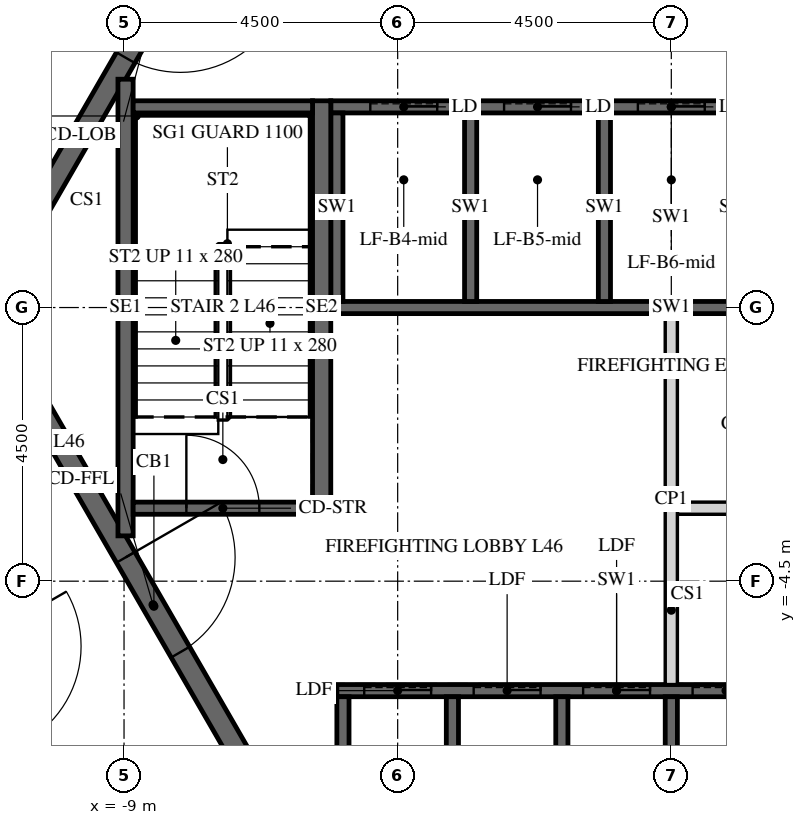
"""IFC4 building model, lengths in metres.
Left out: names, types, materials, properties, quantities, classifications, styles, units other than length and angle.
Written with IfcOpenShell. Run it as: python <this file> out.ifc"""

import sys

from ifc_helpers import new_model, si_unit, direction, frame, frame_2d, origin, place, context, subcontext, project, spatial, polyline, rectangle, outline, extrude, element, fill, save


model = new_model("IFC4")
c1 = context("Model", 3, precision=1e-05, world=origin(), true_north=direction((0.0, 1.0)))
c2 = subcontext(c1, "Body", "Model", "MODEL_VIEW")
j1 = project(units=[si_unit("LENGTHUNIT", "METRE"), si_unit("PLANEANGLEUNIT", "RADIAN")], contexts=[c1])
p1 = place(None, origin())
s1 = spatial("IfcSite", under=j1, at=p1, CompositionType="ELEMENT")
p2 = place(p1, origin())
s2 = spatial("IfcBuilding", under=s1, at=p2, CompositionType="ELEMENT")
p3 = place(p2, frame((0.0, 0.0, 195.6)))
s3 = spatial("IfcBuildingStorey", under=s2, at=p3, CompositionType="ELEMENT", Elevation=195.6)
p4 = place(p3, frame((-7.361, 12.75, -0.15), z_axis=(0.0, 0.0, 1.0), x_axis=(-0.50000571537, -0.866022103989, 0.0)))
e1 = element("IfcWall", 1, at=p4, inside=s3, PredefinedType="SHEAR", context=c2, shape_type="SweptSolid", body=[
    extrude(outline(polyline([(-0.144, -0.25), (14.867, -0.25), (14.578, 0.25), (0.144, 0.25), (-0.144, -0.25)])), origin(), (0.0, 0.0, 1.0), 3.9),
])
p5 = place(p4, frame((6.49, 0.0, 0.15)))
e2 = element("IfcOpeningElement", 2, at=p5, cuts=e1, PredefinedType="OPENING", context=c2, shape_type="SweptSolid", body=[
    extrude(rectangle(XDim=1.8, YDim=2.4, at=frame_2d((0.9, 1.2))), frame((0.0, 0.26, 0.0), z_axis=(0.0, -1.0, 0.0), x_axis=(1.0, 0.0, 0.0)), (0.0, 0.0, 1.0), 0.52),
])
p6 = place(p3, frame((-14.722, 0.0, -0.15), z_axis=(0.0, 0.0, 1.0), x_axis=(0.50000571537, -0.866022103989, 0.0)))
e3 = element("IfcWall", 3, at=p6, inside=s3, PredefinedType="SHEAR", context=c2, shape_type="SweptSolid", body=[
    extrude(outline(polyline([(-0.144, -0.25), (14.867, -0.25), (14.578, 0.25), (0.144, 0.25), (-0.144, -0.25)])), origin(), (0.0, 0.0, 1.0), 3.9),
])
p7 = place(p6, frame((6.432, 0.0, 0.15)))
e4 = element("IfcOpeningElement", 4, at=p7, cuts=e3, PredefinedType="OPENING", context=c2, shape_type="SweptSolid", body=[
    extrude(rectangle(XDim=1.8, YDim=2.4, at=frame_2d((0.9, 1.2))), frame((0.0, 0.26, 0.0), z_axis=(0.0, -1.0, 0.0), x_axis=(1.0, 0.0, 0.0)), (0.0, 0.0, 1.0), 0.52),
])
p8 = place(p3, frame((-5.673, 9.825, -0.15), z_axis=(0.0, 0.0, 1.0), x_axis=(-0.499995046907, -0.866028263435, 0.0)))
e5 = element("IfcWall", 5, at=p8, inside=s3, PredefinedType="SHEAR", context=c2, shape_type="SweptSolid", body=[
    extrude(outline(polyline([(-0.101, -0.175), (11.446, -0.175), (11.244, 0.175), (0.101, 0.175), (-0.101, -0.175)])), origin(), (0.0, 0.0, 1.0), 3.9),
])
p9 = place(p8, frame((4.801, 0.0, 0.15)))
e6 = element("IfcOpeningElement", 6, at=p9, cuts=e5, PredefinedType="OPENING", context=c2, shape_type="SweptSolid", body=[
    extrude(rectangle(XDim=1.8, YDim=2.4, at=frame_2d((0.9, 1.2))), frame((0.0, 0.185, 0.0), z_axis=(0.0, -1.0, 0.0), x_axis=(1.0, 0.0, 0.0)), (0.0, 0.0, 1.0), 0.37),
])
p10 = place(p3, frame((-11.345, 0.0, -0.15), z_axis=(0.0, 0.0, 1.0), x_axis=(0.499995046907, -0.866028263435, 0.0)))
e7 = element("IfcWall", 7, at=p10, inside=s3, PredefinedType="SHEAR", context=c2, shape_type="SweptSolid", body=[
    extrude(outline(polyline([(-0.101, -0.175), (11.446, -0.175), (11.244, 0.175), (0.101, 0.175), (-0.101, -0.175)])), origin(), (0.0, 0.0, 1.0), 3.9),
])
p11 = place(p10, frame((4.744, 0.0, 0.15)))
e8 = element("IfcOpeningElement", 8, at=p11, cuts=e7, PredefinedType="OPENING", context=c2, shape_type="SweptSolid", body=[
    extrude(rectangle(XDim=1.8, YDim=2.4, at=frame_2d((0.9, 1.2))), frame((0.0, 0.185, 0.0), z_axis=(0.0, -1.0, 0.0), x_axis=(1.0, 0.0, 0.0)), (0.0, 0.0, 1.0), 0.37),
])
p12 = place(p3, frame((-5.6, 3.3, -0.25), z_axis=(0.0, 0.0, 1.0), x_axis=(1.0, 0.0, 0.0)))
e9 = element("IfcWall", 9, at=p12, inside=s3, PredefinedType="SHEAR", context=c2, shape_type="SweptSolid", body=[
    extrude(rectangle(XDim=11.2, YDim=0.2, at=frame_2d((5.6, 0.0))), origin(), (0.0, 0.0, 1.0), 3.9),
])
p13 = place(p12, frame((0.65, 0.0, 0.25)))
e10 = element("IfcOpeningElement", 10, at=p13, cuts=e9, PredefinedType="OPENING", context=c2, shape_type="SweptSolid", body=[
    extrude(rectangle(XDim=1.1, YDim=2.1, at=frame_2d((0.55, 1.05))), frame((0.0, 0.11, 0.0), z_axis=(0.0, -1.0, 0.0), x_axis=(1.0, 0.0, 0.0)), (0.0, 0.0, 1.0), 0.22),
])
p14 = place(p12, frame((2.85, 0.0, 0.25)))
e11 = element("IfcOpeningElement", 11, at=p14, cuts=e9, PredefinedType="OPENING", context=c2, shape_type="SweptSolid", body=[
    extrude(rectangle(XDim=1.1, YDim=2.1, at=frame_2d((0.55, 1.05))), frame((0.0, 0.11, 0.0), z_axis=(0.0, -1.0, 0.0), x_axis=(1.0, 0.0, 0.0)), (0.0, 0.0, 1.0), 0.22),
])
p15 = place(p12, frame((5.05, 0.0, 0.25)))
e12 = element("IfcOpeningElement", 12, at=p15, cuts=e9, PredefinedType="OPENING", context=c2, shape_type="SweptSolid", body=[
    extrude(rectangle(XDim=1.1, YDim=2.1, at=frame_2d((0.55, 1.05))), frame((0.0, 0.11, 0.0), z_axis=(0.0, -1.0, 0.0), x_axis=(1.0, 0.0, 0.0)), (0.0, 0.0, 1.0), 0.22),
])
p16 = place(p12, frame((7.25, 0.0, 0.25)))
e13 = element("IfcOpeningElement", 13, at=p16, cuts=e9, PredefinedType="OPENING", context=c2, shape_type="SweptSolid", body=[
    extrude(rectangle(XDim=1.1, YDim=2.1, at=frame_2d((0.55, 1.05))), frame((0.0, 0.11, 0.0), z_axis=(0.0, -1.0, 0.0), x_axis=(1.0, 0.0, 0.0)), (0.0, 0.0, 1.0), 0.22),
])
p17 = place(p12, frame((9.45, 0.0, 0.25)))
e14 = element("IfcOpeningElement", 14, at=p17, cuts=e9, PredefinedType="OPENING", context=c2, shape_type="SweptSolid", body=[
    extrude(rectangle(XDim=1.1, YDim=2.1, at=frame_2d((0.55, 1.05))), frame((0.0, 0.11, 0.0), z_axis=(0.0, -1.0, 0.0), x_axis=(1.0, 0.0, 0.0)), (0.0, 0.0, 1.0), 0.22),
])
p18 = place(p3, frame((-5.6, 0.0, -0.25), z_axis=(0.0, 0.0, 1.0), x_axis=(1.0, 0.0, 0.0)))
e15 = element("IfcWall", 15, at=p18, inside=s3, PredefinedType="SHEAR", context=c2, shape_type="SweptSolid", body=[
    extrude(rectangle(XDim=11.2, YDim=0.2, at=frame_2d((5.6, 0.0))), origin(), (0.0, 0.0, 1.0), 3.9),
])
for number, where, z_axis, x_axis in (
    (16, (-5.5, 0.1, -0.25), (0.0, 0.0, 1.0), (0.0, 1.0, 0.0)),
    (17, (-3.3, 0.1, -0.25), (0.0, 0.0, 1.0), (0.0, 1.0, 0.0)),
    (18, (-1.1, 0.1, -0.25), (0.0, 0.0, 1.0), (0.0, 1.0, 0.0)),
):
    element("IfcWall", number, at=place(p3, frame(where, z_axis=z_axis, x_axis=x_axis)), inside=s3, PredefinedType="SHEAR", context=c2, shape_type="SweptSolid", body=[
        extrude(rectangle(XDim=3.1, YDim=0.2, at=frame_2d((1.55, 0.0))), origin(), (0.0, 0.0, 1.0), 3.9),
    ])
p19 = place(p3, frame((-5.5, -6.3, -0.25), z_axis=(0.0, 0.0, 1.0), x_axis=(1.0, 0.0, 0.0)))
e19 = element("IfcWall", 19, at=p19, inside=s3, PredefinedType="SHEAR", context=c2, shape_type="SweptSolid", body=[
    extrude(rectangle(XDim=9.2, YDim=0.2, at=frame_2d((4.6, 0.0))), origin(), (0.0, 0.0, 1.0), 3.9),
])
p20 = place(p19, frame((0.45, 0.0, 0.25)))
e20 = element("IfcOpeningElement", 20, at=p20, cuts=e19, PredefinedType="OPENING", context=c2, shape_type="SweptSolid", body=[
    extrude(rectangle(XDim=1.1, YDim=2.1, at=frame_2d((0.55, 1.05))), frame((0.0, 0.11, 0.0), z_axis=(0.0, -1.0, 0.0), x_axis=(1.0, 0.0, 0.0)), (0.0, 0.0, 1.0), 0.22),
])
p21 = place(p19, frame((2.25, 0.0, 0.25)))
e21 = element("IfcOpeningElement", 21, at=p21, cuts=e19, PredefinedType="OPENING", context=c2, shape_type="SweptSolid", body=[
    extrude(rectangle(XDim=1.1, YDim=2.1, at=frame_2d((0.55, 1.05))), frame((0.0, 0.11, 0.0), z_axis=(0.0, -1.0, 0.0), x_axis=(1.0, 0.0, 0.0)), (0.0, 0.0, 1.0), 0.22),
])
p22 = place(p19, frame((4.05, 0.0, 0.25)))
e22 = element("IfcOpeningElement", 22, at=p22, cuts=e19, PredefinedType="OPENING", context=c2, shape_type="SweptSolid", body=[
    extrude(rectangle(XDim=1.1, YDim=2.1, at=frame_2d((0.55, 1.05))), frame((0.0, 0.11, 0.0), z_axis=(0.0, -1.0, 0.0), x_axis=(1.0, 0.0, 0.0)), (0.0, 0.0, 1.0), 0.22),
])
p23 = place(p19, frame((5.85, 0.0, 0.25)))
e23 = element("IfcOpeningElement", 23, at=p23, cuts=e19, PredefinedType="OPENING", context=c2, shape_type="SweptSolid", body=[
    extrude(rectangle(XDim=1.1, YDim=2.1, at=frame_2d((0.55, 1.05))), frame((0.0, 0.11, 0.0), z_axis=(0.0, -1.0, 0.0), x_axis=(1.0, 0.0, 0.0)), (0.0, 0.0, 1.0), 0.22),
])
p24 = place(p19, frame((7.65, 0.0, 0.25)))
e24 = element("IfcOpeningElement", 24, at=p24, cuts=e19, PredefinedType="OPENING", context=c2, shape_type="SweptSolid", body=[
    extrude(rectangle(XDim=1.1, YDim=2.1, at=frame_2d((0.55, 1.05))), frame((0.0, 0.11, 0.0), z_axis=(0.0, -1.0, 0.0), x_axis=(1.0, 0.0, 0.0)), (0.0, 0.0, 1.0), 0.22),
])
for number, where, z_axis, x_axis in (
    (25, (-5.4, -9.3, -0.25), (0.0, 0.0, 1.0), (0.0, 1.0, 0.0)),
    (26, (-3.6, -9.3, -0.25), (0.0, 0.0, 1.0), (0.0, 1.0, 0.0)),
    (27, (-1.8, -9.3, -0.25), (0.0, 0.0, 1.0), (0.0, 1.0, 0.0)),
    (28, (0.0, -9.3, -0.25), (0.0, 0.0, 1.0), (0.0, 1.0, 0.0)),
):
    element("IfcWall", number, at=place(p3, frame(where, z_axis=z_axis, x_axis=x_axis)), inside=s3, PredefinedType="SHEAR", context=c2, shape_type="SweptSolid", body=[
        extrude(rectangle(XDim=2.9, YDim=0.2, at=frame_2d((1.45, 0.0))), origin(), (0.0, 0.0, 1.0), 3.9),
    ])
p25 = place(p3, frame((0.1, -3.3, 0.0), z_axis=(0.0, 0.0, 1.0), x_axis=(1.0, 0.0, 0.0)))
e29 = element("IfcWall", 29, at=p25, inside=s3, PredefinedType="PARTITIONING", context=c2, shape_type="SweptSolid", body=[
    extrude(rectangle(XDim=2.85, YDim=0.2, at=frame_2d((1.425, 0.0))), origin(), (0.0, 0.0, 1.0), 3.65),
])
p26 = place(p25, frame((0.875, 0.0, 0.0)))
e30 = element("IfcOpeningElement", 30, at=p26, cuts=e29, PredefinedType="OPENING", context=c2, shape_type="SweptSolid", body=[
    extrude(rectangle(XDim=0.9, YDim=2.1, at=frame_2d((0.45, 1.05))), frame((0.0, 0.11, 0.0), z_axis=(0.0, -1.0, 0.0), x_axis=(1.0, 0.0, 0.0)), (0.0, 0.0, 1.0), 0.22),
])
p27 = place(p3, frame((0.0, -6.2, 0.0), z_axis=(0.0, 0.0, 1.0), x_axis=(0.0, 1.0, 0.0)))
e31 = element("IfcWall", 31, at=p27, inside=s3, PredefinedType="PARTITIONING", context=c2, shape_type="SweptSolid", body=[
    extrude(rectangle(XDim=6.1, YDim=0.2, at=frame_2d((3.05, 0.0))), origin(), (0.0, 0.0, 1.0), 3.65),
])
p28 = place(p3, frame((-5.75, -3.4, -0.25), z_axis=(0.0, 0.0, 1.0), x_axis=(0.0, 1.0, 0.0)))
e32 = element("IfcWall", 32, at=p28, inside=s3, PredefinedType="SHEAR", context=c2, shape_type="SweptSolid", body=[
    extrude(rectangle(XDim=6.8, YDim=0.3, at=frame_2d((3.4, 0.0))), origin(), (0.0, 0.0, 1.0), 3.9),
])
p29 = place(p3, frame((-8.975, -3.755, -0.25), z_axis=(0.0, 0.0, 1.0), x_axis=(0.0, 1.0, 0.0)))
e33 = element("IfcWall", 33, at=p29, inside=s3, PredefinedType="SHEAR", context=c2, shape_type="SweptSolid", body=[
    extrude(rectangle(XDim=7.51, YDim=0.25, at=frame_2d((3.755, 0.0))), origin(), (0.0, 0.0, 1.0), 3.9),
])
p30 = place(p3, frame((-8.85, 3.3, -0.25), z_axis=(0.0, 0.0, 1.0), x_axis=(1.0, 0.0, 0.0)))
e34 = element("IfcWall", 34, at=p30, inside=s3, PredefinedType="SHEAR", context=c2, shape_type="SweptSolid", body=[
    extrude(rectangle(XDim=2.95, YDim=0.2, at=frame_2d((1.475, 0.0))), origin(), (0.0, 0.0, 1.0), 3.9),
])
p31 = place(p3, frame((-8.85, -3.3, -0.25), z_axis=(0.0, 0.0, 1.0), x_axis=(1.0, 0.0, 0.0)))
e35 = element("IfcWall", 35, at=p31, inside=s3, PredefinedType="SHEAR", context=c2, shape_type="SweptSolid", body=[
    extrude(rectangle(XDim=2.95, YDim=0.2, at=frame_2d((1.475, 0.0))), origin(), (0.0, 0.0, 1.0), 3.9),
])
p32 = place(p31, frame((0.875, 0.0, 0.25)))
e36 = element("IfcOpeningElement", 36, at=p32, cuts=e35, PredefinedType="OPENING", context=c2, shape_type="SweptSolid", body=[
    extrude(rectangle(XDim=1.2, YDim=2.4, at=frame_2d((0.6, 1.2))), frame((0.0, 0.11, 0.0), z_axis=(0.0, -1.0, 0.0), x_axis=(1.0, 0.0, 0.0)), (0.0, 0.0, 1.0), 0.22),
])
p33 = place(p3, frame((-8.704, 14.925, 0.0), z_axis=(0.0, 0.0, 1.0), x_axis=(-0.500001272756, -0.866024668957, 0.0)))
e37 = element("IfcWall", 37, at=p33, inside=s3, PredefinedType="PARTITIONING", context=c2, shape_type="SweptSolid", body=[
    extrude(rectangle(XDim=14.78, YDim=0.15, at=frame_2d((7.39, 0.0))), origin(), (0.0, 0.0, 1.0), 2.988),
])
p34 = place(p33, frame((1.001, 0.0, 0.0)))
e38 = element("IfcOpeningElement", 38, at=p34, cuts=e37, PredefinedType="OPENING", context=c2, shape_type="SweptSolid", body=[
    extrude(rectangle(XDim=1.0, YDim=2.1, at=frame_2d((0.5, 1.05))), frame((0.0, 0.085, 0.0), z_axis=(0.0, -1.0, 0.0), x_axis=(1.0, 0.0, 0.0)), (0.0, 0.0, 1.0), 0.17),
])
p35 = place(p33, frame((7.281, 0.0, 0.0)))
e39 = element("IfcOpeningElement", 39, at=p35, cuts=e37, PredefinedType="OPENING", context=c2, shape_type="SweptSolid", body=[
    extrude(rectangle(XDim=1.0, YDim=2.1, at=frame_2d((0.5, 1.05))), frame((0.0, 0.085, 0.0), z_axis=(0.0, -1.0, 0.0), x_axis=(1.0, 0.0, 0.0)), (0.0, 0.0, 1.0), 0.17),
])
p36 = place(p3, frame((-15.094, -3.856, 0.0), z_axis=(0.0, 0.0, 1.0), x_axis=(0.500006037985, -0.866021917724, 0.0)))
e40 = element("IfcWall", 40, at=p36, inside=s3, PredefinedType="PARTITIONING", context=c2, shape_type="SweptSolid", body=[
    extrude(rectangle(XDim=12.867, YDim=0.15, at=frame_2d((6.434, 0.0))), origin(), (0.0, 0.0, 1.0), 2.988),
])
p37 = place(p36, frame((6.025, 0.0, 0.0)))
e41 = element("IfcOpeningElement", 41, at=p37, cuts=e40, PredefinedType="OPENING", context=c2, shape_type="SweptSolid", body=[
    extrude(rectangle(XDim=1.0, YDim=2.1, at=frame_2d((0.5, 1.05))), frame((0.0, 0.085, 0.0), z_axis=(0.0, -1.0, 0.0), x_axis=(1.0, 0.0, 0.0)), (0.0, 0.0, 1.0), 0.17),
])
p38 = place(p36, frame((11.717, 0.0, 0.0)))
e42 = element("IfcOpeningElement", 42, at=p38, cuts=e40, PredefinedType="OPENING", context=c2, shape_type="SweptSolid", body=[
    extrude(rectangle(XDim=1.0, YDim=2.1, at=frame_2d((0.5, 1.05))), frame((0.0, 0.085, 0.0), z_axis=(0.0, -1.0, 0.0), x_axis=(1.0, 0.0, 0.0)), (0.0, 0.0, 1.0), 0.17),
])
p39 = place(p9, origin())
e43 = element("IfcDoor", 43, at=p39, inside=s3, OperationType="DOUBLE_DOOR_SINGLE_SWING", PredefinedType="DOOR", context=c2, shape_type="SweptSolid", body=[
    extrude(rectangle(XDim=1.8, YDim=2.4, at=frame_2d((0.9, 1.2))), frame((0.0, 0.025, 0.0), z_axis=(0.0, -1.0, 0.0), x_axis=(1.0, 0.0, 0.0)), (0.0, 0.0, 1.0), 0.05),
])
fill(e6, e43)
p40 = place(p11, origin())
e44 = element("IfcDoor", 44, at=p40, inside=s3, OperationType="DOUBLE_DOOR_SINGLE_SWING", PredefinedType="DOOR", context=c2, shape_type="SweptSolid", body=[
    extrude(rectangle(XDim=1.8, YDim=2.4, at=frame_2d((0.9, 1.2))), frame((0.0, 0.025, 0.0), z_axis=(0.0, -1.0, 0.0), x_axis=(1.0, 0.0, 0.0)), (0.0, 0.0, 1.0), 0.05),
])
fill(e8, e44)
p41 = place(p32, origin())
e45 = element("IfcDoor", 45, at=p41, inside=s3, OperationType="SINGLE_SWING_LEFT", PredefinedType="DOOR", context=c2, shape_type="SweptSolid", body=[
    extrude(rectangle(XDim=1.2, YDim=2.4, at=frame_2d((0.6, 1.2))), frame((0.0, 0.025, 0.0), z_axis=(0.0, -1.0, 0.0), x_axis=(1.0, 0.0, 0.0)), (0.0, 0.0, 1.0), 0.05),
])
fill(e36, e45)
p42 = place(p13, origin())
e46 = element("IfcDoor", 46, at=p42, inside=s3, OperationType="SLIDING_TO_LEFT", PredefinedType="DOOR", context=c2, shape_type="SweptSolid", body=[
    extrude(rectangle(XDim=1.1, YDim=2.1, at=frame_2d((0.55, 1.05))), frame((0.0, 0.025, 0.0), z_axis=(0.0, -1.0, 0.0), x_axis=(1.0, 0.0, 0.0)), (0.0, 0.0, 1.0), 0.05),
])
fill(e10, e46)
p43 = place(p14, origin())
e47 = element("IfcDoor", 47, at=p43, inside=s3, OperationType="SLIDING_TO_LEFT", PredefinedType="DOOR", context=c2, shape_type="SweptSolid", body=[
    extrude(rectangle(XDim=1.1, YDim=2.1, at=frame_2d((0.55, 1.05))), frame((0.0, 0.025, 0.0), z_axis=(0.0, -1.0, 0.0), x_axis=(1.0, 0.0, 0.0)), (0.0, 0.0, 1.0), 0.05),
])
fill(e11, e47)
p44 = place(p15, origin())
e48 = element("IfcDoor", 48, at=p44, inside=s3, OperationType="SLIDING_TO_LEFT", PredefinedType="DOOR", context=c2, shape_type="SweptSolid", body=[
    extrude(rectangle(XDim=1.1, YDim=2.1, at=frame_2d((0.55, 1.05))), frame((0.0, 0.025, 0.0), z_axis=(0.0, -1.0, 0.0), x_axis=(1.0, 0.0, 0.0)), (0.0, 0.0, 1.0), 0.05),
])
fill(e12, e48)
p45 = place(p20, origin())
e49 = element("IfcDoor", 49, at=p45, inside=s3, OperationType="SLIDING_TO_LEFT", PredefinedType="DOOR", context=c2, shape_type="SweptSolid", body=[
    extrude(rectangle(XDim=1.1, YDim=2.1, at=frame_2d((0.55, 1.05))), frame((0.0, 0.025, 0.0), z_axis=(0.0, -1.0, 0.0), x_axis=(1.0, 0.0, 0.0)), (0.0, 0.0, 1.0), 0.05),
])
fill(e20, e49)
p46 = place(p21, origin())
e50 = element("IfcDoor", 50, at=p46, inside=s3, OperationType="SLIDING_TO_LEFT", PredefinedType="DOOR", context=c2, shape_type="SweptSolid", body=[
    extrude(rectangle(XDim=1.1, YDim=2.1, at=frame_2d((0.55, 1.05))), frame((0.0, 0.025, 0.0), z_axis=(0.0, -1.0, 0.0), x_axis=(1.0, 0.0, 0.0)), (0.0, 0.0, 1.0), 0.05),
])
fill(e21, e50)
p47 = place(p22, origin())
e51 = element("IfcDoor", 51, at=p47, inside=s3, OperationType="SLIDING_TO_LEFT", PredefinedType="DOOR", context=c2, shape_type="SweptSolid", body=[
    extrude(rectangle(XDim=1.1, YDim=2.1, at=frame_2d((0.55, 1.05))), frame((0.0, 0.025, 0.0), z_axis=(0.0, -1.0, 0.0), x_axis=(1.0, 0.0, 0.0)), (0.0, 0.0, 1.0), 0.05),
])
fill(e22, e51)
p48 = place(p23, origin())
e52 = element("IfcDoor", 52, at=p48, inside=s3, OperationType="SLIDING_TO_LEFT", PredefinedType="DOOR", context=c2, shape_type="SweptSolid", body=[
    extrude(rectangle(XDim=1.1, YDim=2.1, at=frame_2d((0.55, 1.05))), frame((0.0, 0.025, 0.0), z_axis=(0.0, -1.0, 0.0), x_axis=(1.0, 0.0, 0.0)), (0.0, 0.0, 1.0), 0.05),
])
fill(e23, e52)
save(model, sys.argv[1])
